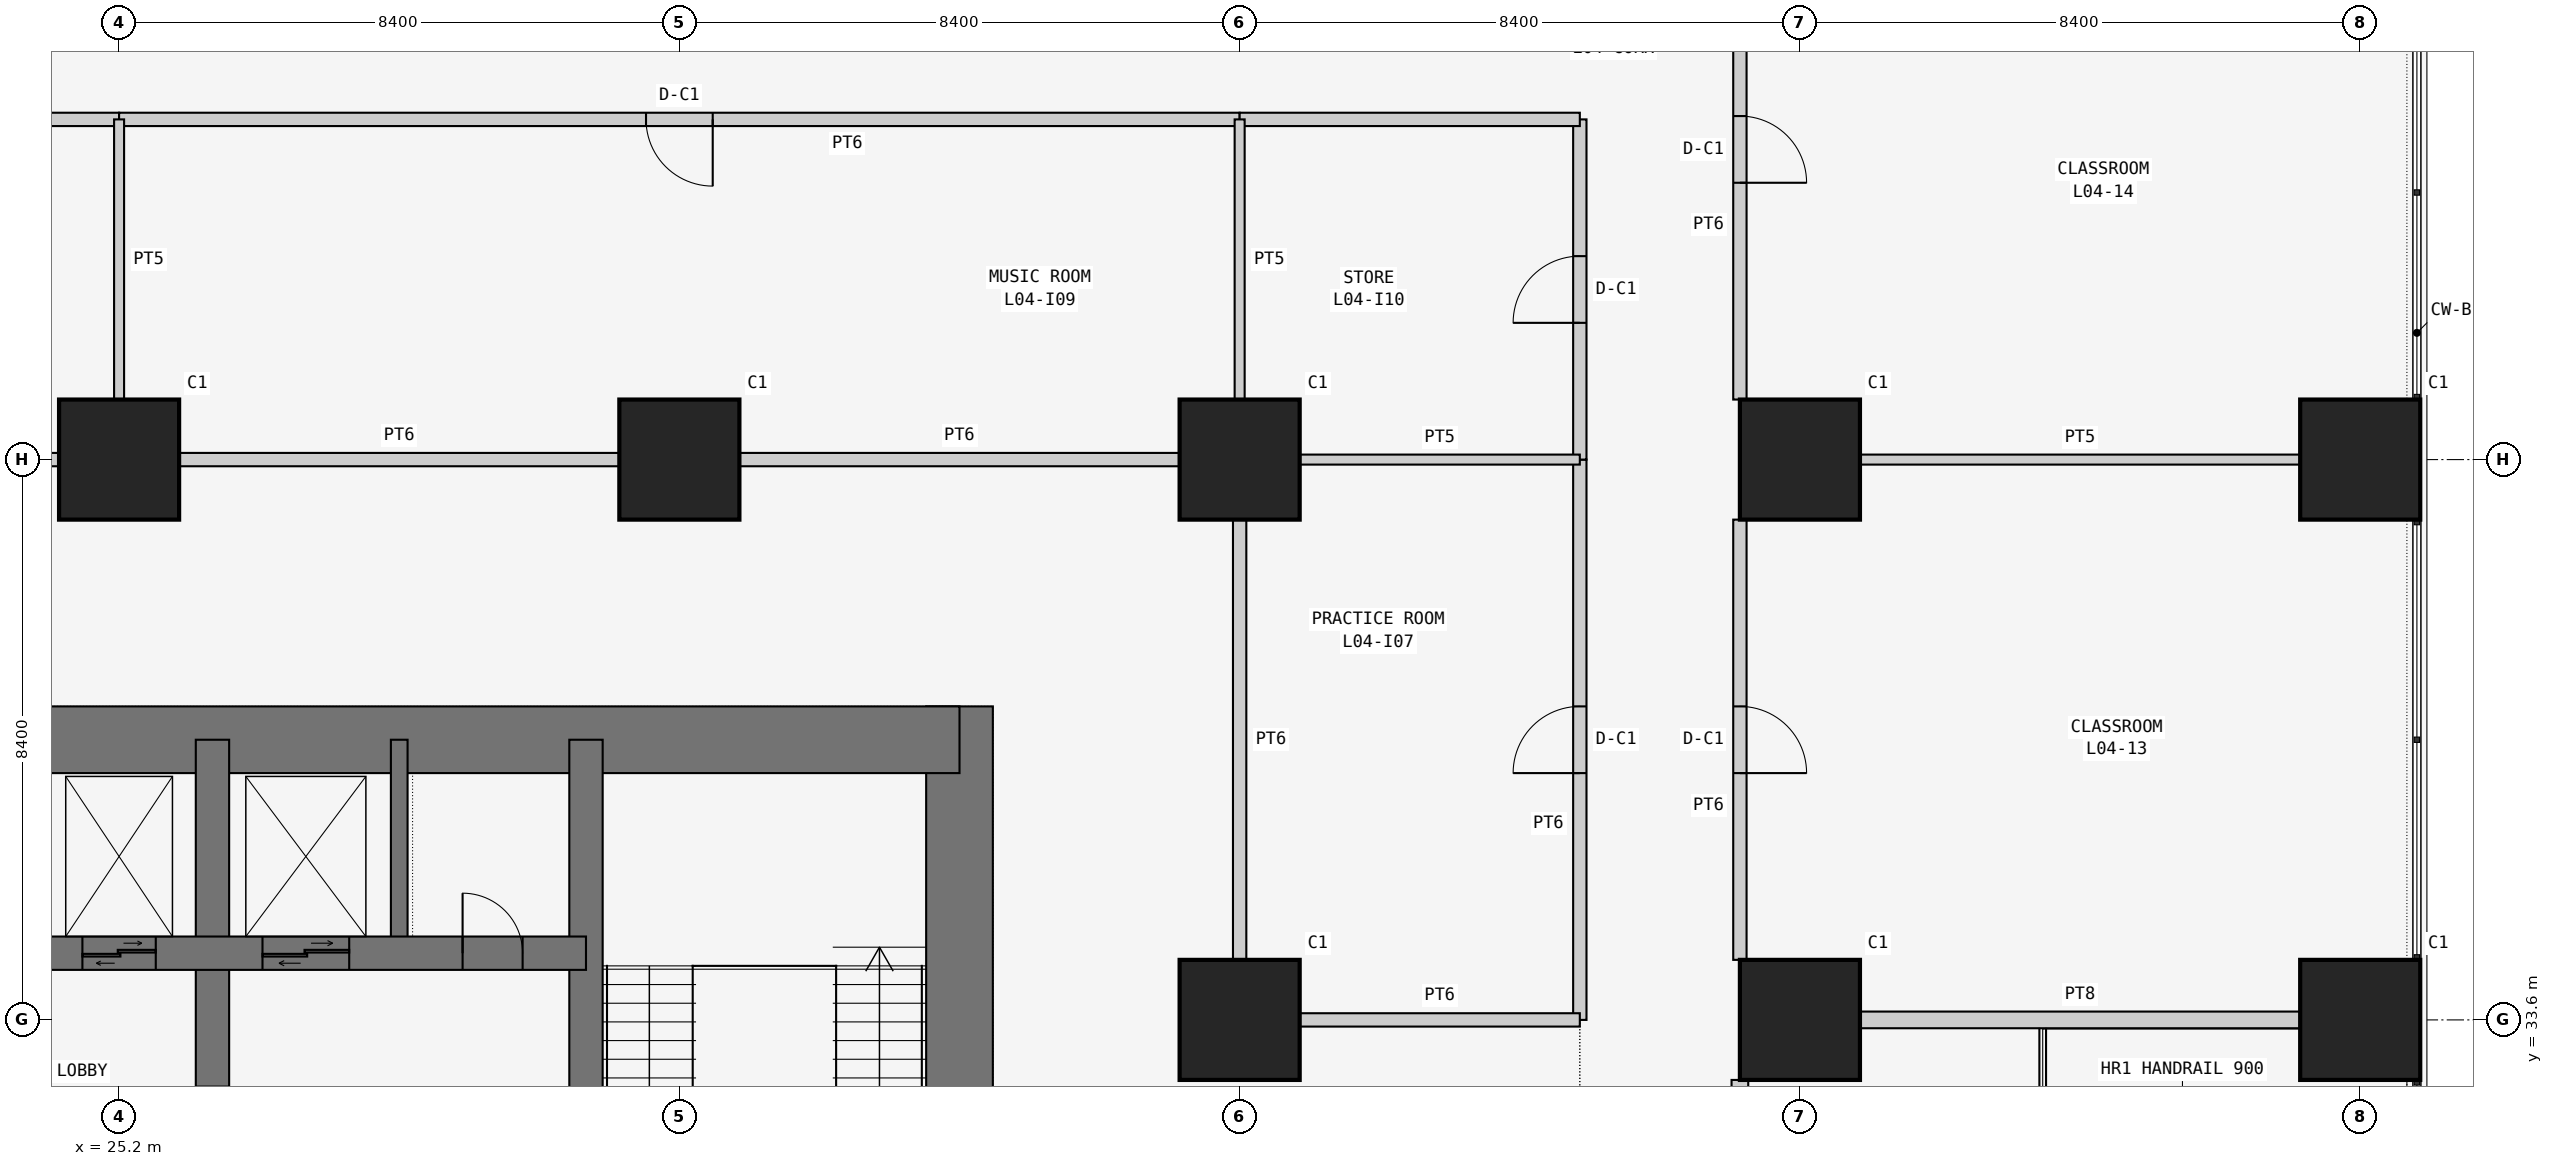
"""IFC4 building model, lengths in metres.
Left out: names, types, materials, properties, quantities, classifications, styles, units other than length and angle.
Written with IfcOpenShell. Run it as: python <this file> out.ifc"""

import sys

from ifc_helpers import new_model, si_unit, direction, frame, frame_2d, origin, origin_2d, place, context, subcontext, project, spatial, rectangle, extrude, element, fill, save


model = new_model("IFC4")
c1 = context("Model", 3, precision=1e-05, world=origin(), true_north=direction((0.0, 1.0)))
c2 = subcontext(c1, "Body", "Model", "MODEL_VIEW")
j1 = project(units=[si_unit("LENGTHUNIT", "METRE"), si_unit("PLANEANGLEUNIT", "RADIAN")], contexts=[c1])
p1 = place(None, origin())
s1 = spatial("IfcSite", under=j1, at=p1, CompositionType="ELEMENT")
p2 = place(p1, origin())
s2 = spatial("IfcBuilding", under=s1, at=p2, CompositionType="ELEMENT")
p3 = place(p2, frame((0.0, 0.0, 19.5)))
s3 = spatial("IfcBuildingStorey", under=s2, at=p3, CompositionType="ELEMENT", Elevation=19.5)
for number, where, z_axis, x_axis in (
    (1, (25.2, 42.0, 0.0), (0.0, 0.0, 1.0), (1.0, 0.0, 0.0)),
    (2, (33.6, 42.0, 0.0), (0.0, 0.0, 1.0), (1.0, 0.0, 0.0)),
    (3, (42.0, 33.6, 0.0), (0.0, 0.0, 1.0), (1.0, 0.0, 0.0)),
    (4, (42.0, 42.0, 0.0), (0.0, 0.0, 1.0), (1.0, 0.0, 0.0)),
    (5, (50.4, 33.6, 0.0), (0.0, 0.0, 1.0), (1.0, 0.0, 0.0)),
    (6, (50.4, 42.0, 0.0), (0.0, 0.0, 1.0), (1.0, 0.0, 0.0)),
    (7, (58.8, 33.6, 0.0), (0.0, 0.0, 1.0), (1.0, 0.0, 0.0)),
    (8, (58.8, 42.0, 0.0), (0.0, 0.0, 1.0), (1.0, 0.0, 0.0)),
):
    element("IfcColumn", number, at=place(p3, frame(where, z_axis=z_axis, x_axis=x_axis)), inside=s3, PredefinedType="COLUMN", context=c2, shape_type="SweptSolid", body=[
        extrude(rectangle(XDim=1.8, YDim=1.8, at=origin_2d()), origin(), (0.0, 0.0, 1.0), 4.5),
    ])
p4 = place(p3, frame((37.8, 21.0, 0.0), z_axis=(0.0, 0.0, 1.0), x_axis=(0.0, 1.0, 0.0)))
e9 = element("IfcWall", 9, at=p4, inside=s3, PredefinedType="SHEAR", context=c2, shape_type="SweptSolid", body=[
    extrude(rectangle(XDim=17.3, YDim=1.0, at=frame_2d((8.65, 0.0))), origin(), (0.0, 0.0, 1.0), 4.5),
])
p5 = place(p4, frame((5.2, 0.0, 0.0)))
e10 = element("IfcOpeningElement", 10, at=p5, cuts=e9, PredefinedType="OPENING", context=c2, shape_type="SweptSolid", body=[
    extrude(rectangle(XDim=1.2, YDim=2.1, at=frame_2d((0.6, 1.05))), frame((0.0, 0.51, 0.0), z_axis=(0.0, -1.0, 0.0), x_axis=(1.0, 0.0, 0.0)), (0.0, 0.0, 1.0), 1.02),
])
p6 = place(p3, frame((37.8, 37.8, 0.0), z_axis=(0.0, 0.0, 1.0), x_axis=(-1.0, 0.0, 0.0)))
e11 = element("IfcWall", 11, at=p6, inside=s3, PredefinedType="SHEAR", context=c2, shape_type="SweptSolid", body=[
    extrude(rectangle(XDim=17.3, YDim=1.0, at=frame_2d((8.65, 0.0))), origin(), (0.0, 0.0, 1.0), 4.5),
])
p7 = place(p3, frame((26.6, 21.0, 0.0), z_axis=(0.0, 0.0, 1.0), x_axis=(0.0, 1.0, 0.0)))
e12 = element("IfcWall", 12, at=p7, inside=s3, PredefinedType="SHEAR", context=c2, shape_type="SweptSolid", body=[
    extrude(rectangle(XDim=16.8, YDim=0.5, at=frame_2d((8.4, 0.0))), origin(), (0.0, 0.0, 1.0), 4.5),
])
p8 = place(p7, frame((10.4, 0.0, 0.0)))
e13 = element("IfcOpeningElement", 13, at=p8, cuts=e12, PredefinedType="OPENING", context=c2, shape_type="SweptSolid", body=[
    extrude(rectangle(XDim=1.2, YDim=2.1, at=frame_2d((0.6, 1.05))), frame((0.0, 0.26, 0.0), z_axis=(0.0, -1.0, 0.0), x_axis=(1.0, 0.0, 0.0)), (0.0, 0.0, 1.0), 0.52),
])
p9 = place(p3, frame((21.0, 34.6, 0.0), z_axis=(0.0, 0.0, 1.0), x_axis=(1.0, 0.0, 0.0)))
e14 = element("IfcWall", 14, at=p9, inside=s3, PredefinedType="SHEAR", context=c2, shape_type="SweptSolid", body=[
    extrude(rectangle(XDim=11.2, YDim=0.5, at=frame_2d((5.6, 0.0))), origin(), (0.0, 0.0, 1.0), 4.5),
])
p10 = place(p9, frame((9.35, 0.0, 0.0)))
e15 = element("IfcOpeningElement", 15, at=p10, cuts=e14, PredefinedType="OPENING", context=c2, shape_type="SweptSolid", body=[
    extrude(rectangle(XDim=0.9, YDim=2.1, at=frame_2d((0.45, 1.05))), frame((0.0, 0.26, 0.0), z_axis=(0.0, -1.0, 0.0), x_axis=(1.0, 0.0, 0.0)), (0.0, 0.0, 1.0), 0.52),
])
p11 = place(p9, frame((1.0, 0.0, 0.0)))
e16 = element("IfcOpeningElement", 16, at=p11, cuts=e14, PredefinedType="OPENING", context=c2, shape_type="SweptSolid", body=[
    extrude(rectangle(XDim=1.1, YDim=2.1, at=frame_2d((0.55, 1.05))), frame((0.0, 0.26, 0.0), z_axis=(0.0, -1.0, 0.0), x_axis=(1.0, 0.0, 0.0)), (0.0, 0.0, 1.0), 0.52),
])
p12 = place(p9, frame((3.65, 0.0, 0.0)))
e17 = element("IfcOpeningElement", 17, at=p12, cuts=e14, PredefinedType="OPENING", context=c2, shape_type="SweptSolid", body=[
    extrude(rectangle(XDim=1.1, YDim=2.1, at=frame_2d((0.55, 1.05))), frame((0.0, 0.26, 0.0), z_axis=(0.0, -1.0, 0.0), x_axis=(1.0, 0.0, 0.0)), (0.0, 0.0, 1.0), 0.52),
])
p13 = place(p9, frame((6.35, 0.0, 0.0)))
e18 = element("IfcOpeningElement", 18, at=p13, cuts=e14, PredefinedType="OPENING", context=c2, shape_type="SweptSolid", body=[
    extrude(rectangle(XDim=1.3, YDim=2.1, at=frame_2d((0.65, 1.05))), frame((0.0, 0.26, 0.0), z_axis=(0.0, -1.0, 0.0), x_axis=(1.0, 0.0, 0.0)), (0.0, 0.0, 1.0), 0.52),
])
p14 = place(p3, frame((32.2, 29.15, 0.0), z_axis=(0.0, 0.0, 1.0), x_axis=(0.0, 1.0, 0.0)))
e19 = element("IfcWall", 19, at=p14, inside=s3, PredefinedType="SHEAR", context=c2, shape_type="SweptSolid", body=[
    extrude(rectangle(XDim=8.65, YDim=0.5, at=frame_2d((4.325, 0.0))), origin(), (0.0, 0.0, 1.0), 4.5),
])
p15 = place(p3, frame((29.4, 34.6, 0.0), z_axis=(0.0, 0.0, 1.0), x_axis=(0.0, 1.0, 0.0)))
e20 = element("IfcWall", 20, at=p15, inside=s3, PredefinedType="SHEAR", context=c2, shape_type="SweptSolid", body=[
    extrude(rectangle(XDim=3.2, YDim=0.25, at=frame_2d((1.6, 0.0))), origin(), (0.0, 0.0, 1.0), 4.5),
])
p16 = place(p3, frame((51.3, 33.6, 0.0), z_axis=(0.0, 0.0, 1.0), x_axis=(1.0, 0.0, 0.0)))
e21 = element("IfcWall", 21, at=p16, inside=s3, PredefinedType="SOLIDWALL", context=c2, shape_type="SweptSolid", body=[
    extrude(rectangle(XDim=6.6, YDim=0.25, at=frame_2d((3.3, 0.0))), origin(), (0.0, 0.0, 1.0), 3.543),
])
p17 = place(p3, frame((49.5, 26.1, 0.0), z_axis=(0.0, 0.0, 1.0), x_axis=(0.0, 1.0, 0.0)))
e22 = element("IfcWall", 22, at=p17, inside=s3, PredefinedType="SOLIDWALL", context=c2, shape_type="SweptSolid", body=[
    extrude(rectangle(XDim=6.6, YDim=0.25, at=frame_2d((3.3, 0.0))), origin(), (0.0, 0.0, 1.0), 4.3),
])
p18 = place(p17, frame((2.0, 0.0, 0.0)))
e23 = element("IfcOpeningElement", 23, at=p18, cuts=e22, PredefinedType="OPENING", context=c2, shape_type="SweptSolid", body=[
    extrude(rectangle(XDim=2.6, YDim=2.4, at=frame_2d((1.3, 1.2))), frame((0.0, 0.135, 0.0), z_axis=(0.0, -1.0, 0.0), x_axis=(1.0, 0.0, 0.0)), (0.0, 0.0, 1.0), 0.27),
])
p19 = place(p3, frame((51.3, 42.0, 0.0), z_axis=(0.0, 0.0, 1.0), x_axis=(1.0, 0.0, 0.0)))
e24 = element("IfcWall", 24, at=p19, inside=s3, PredefinedType="PARTITIONING", context=c2, shape_type="SweptSolid", body=[
    extrude(rectangle(XDim=6.6, YDim=0.15, at=frame_2d((3.3, 0.0))), origin(), (0.0, 0.0, 1.0), 3.543),
])
p20 = place(p3, frame((49.5, 34.5, 0.0), z_axis=(0.0, 0.0, 1.0), x_axis=(0.0, 1.0, 0.0)))
e25 = element("IfcWall", 25, at=p20, inside=s3, PredefinedType="PARTITIONING", context=c2, shape_type="SweptSolid", body=[
    extrude(rectangle(XDim=6.6, YDim=0.2, at=frame_2d((3.3, 0.0))), origin(), (0.0, 0.0, 1.0), 4.3),
])
p21 = place(p20, frame((2.8, 0.0, 0.0)))
e26 = element("IfcOpeningElement", 26, at=p21, cuts=e25, PredefinedType="OPENING", context=c2, shape_type="SweptSolid", body=[
    extrude(rectangle(XDim=1.0, YDim=2.1, at=frame_2d((0.5, 1.05))), frame((0.0, 0.11, 0.0), z_axis=(0.0, -1.0, 0.0), x_axis=(1.0, 0.0, 0.0)), (0.0, 0.0, 1.0), 0.22),
])
p22 = place(p3, frame((49.5, 42.9, 0.0), z_axis=(0.0, 0.0, 1.0), x_axis=(0.0, 1.0, 0.0)))
e27 = element("IfcWall", 27, at=p22, inside=s3, PredefinedType="PARTITIONING", context=c2, shape_type="SweptSolid", body=[
    extrude(rectangle(XDim=7.5, YDim=0.2, at=frame_2d((3.75, 0.0))), origin(), (0.0, 0.0, 1.0), 4.3),
])
p23 = place(p22, frame((3.25, 0.0, 0.0)))
e28 = element("IfcOpeningElement", 28, at=p23, cuts=e27, PredefinedType="OPENING", context=c2, shape_type="SweptSolid", body=[
    extrude(rectangle(XDim=1.0, YDim=2.1, at=frame_2d((0.5, 1.05))), frame((0.0, 0.11, 0.0), z_axis=(0.0, -1.0, 0.0), x_axis=(1.0, 0.0, 0.0)), (0.0, 0.0, 1.0), 0.22),
])
p24 = place(p3, frame((47.1, 33.6, 0.0), z_axis=(0.0, 0.0, 1.0), x_axis=(0.0, 1.0, 0.0)))
e29 = element("IfcWall", 29, at=p24, inside=s3, PredefinedType="PARTITIONING", context=c2, shape_type="SweptSolid", body=[
    extrude(rectangle(XDim=8.4, YDim=0.2, at=frame_2d((4.2, 0.0))), origin(), (0.0, 0.0, 1.0), 4.3),
])
p25 = place(p24, frame((3.7, 0.0, 0.0)))
e30 = element("IfcOpeningElement", 30, at=p25, cuts=e29, PredefinedType="OPENING", context=c2, shape_type="SweptSolid", body=[
    extrude(rectangle(XDim=1.0, YDim=2.1, at=frame_2d((0.5, 1.05))), frame((0.0, 0.11, 0.0), z_axis=(0.0, -1.0, 0.0), x_axis=(1.0, 0.0, 0.0)), (0.0, 0.0, 1.0), 0.22),
])
p26 = place(p3, frame((25.2, 47.1, 0.0), z_axis=(0.0, 0.0, 1.0), x_axis=(-1.0, 0.0, 0.0)))
e31 = element("IfcWall", 31, at=p26, inside=s3, PredefinedType="PARTITIONING", context=c2, shape_type="SweptSolid", body=[
    extrude(rectangle(XDim=9.75, YDim=0.2, at=frame_2d((4.875, 0.0))), origin(), (0.0, 0.0, 1.0), 4.3),
])
p27 = place(p26, frame((4.375, 0.0, 0.0)))
e32 = element("IfcOpeningElement", 32, at=p27, cuts=e31, PredefinedType="OPENING", context=c2, shape_type="SweptSolid", body=[
    extrude(rectangle(XDim=1.0, YDim=2.1, at=frame_2d((0.5, 1.05))), frame((0.0, 0.11, 0.0), z_axis=(0.0, -1.0, 0.0), x_axis=(1.0, 0.0, 0.0)), (0.0, 0.0, 1.0), 0.22),
])
p28 = place(p3, frame((42.0, 47.1, 0.0), z_axis=(0.0, 0.0, 1.0), x_axis=(-1.0, 0.0, 0.0)))
e33 = element("IfcWall", 33, at=p28, inside=s3, PredefinedType="PARTITIONING", context=c2, shape_type="SweptSolid", body=[
    extrude(rectangle(XDim=16.8, YDim=0.2, at=frame_2d((8.4, 0.0))), origin(), (0.0, 0.0, 1.0), 4.3),
])
p29 = place(p28, frame((7.9, 0.0, 0.0)))
e34 = element("IfcOpeningElement", 34, at=p29, cuts=e33, PredefinedType="OPENING", context=c2, shape_type="SweptSolid", body=[
    extrude(rectangle(XDim=1.0, YDim=2.1, at=frame_2d((0.5, 1.05))), frame((0.0, 0.11, 0.0), z_axis=(0.0, -1.0, 0.0), x_axis=(1.0, 0.0, 0.0)), (0.0, 0.0, 1.0), 0.22),
])
p30 = place(p3, frame((47.1, 42.0, 0.0), z_axis=(0.0, 0.0, 1.0), x_axis=(0.0, 1.0, 0.0)))
e35 = element("IfcWall", 35, at=p30, inside=s3, PredefinedType="PARTITIONING", context=c2, shape_type="SweptSolid", body=[
    extrude(rectangle(XDim=5.1, YDim=0.2, at=frame_2d((2.55, 0.0))), origin(), (0.0, 0.0, 1.0), 4.3),
])
p31 = place(p30, frame((2.05, 0.0, 0.0)))
e36 = element("IfcOpeningElement", 36, at=p31, cuts=e35, PredefinedType="OPENING", context=c2, shape_type="SweptSolid", body=[
    extrude(rectangle(XDim=1.0, YDim=2.1, at=frame_2d((0.5, 1.05))), frame((0.0, 0.11, 0.0), z_axis=(0.0, -1.0, 0.0), x_axis=(1.0, 0.0, 0.0)), (0.0, 0.0, 1.0), 0.22),
])
p32 = place(p3, frame((47.1, 47.1, 0.0), z_axis=(0.0, 0.0, 1.0), x_axis=(-1.0, 0.0, 0.0)))
e37 = element("IfcWall", 37, at=p32, inside=s3, PredefinedType="PARTITIONING", context=c2, shape_type="SweptSolid", body=[
    extrude(rectangle(XDim=5.1, YDim=0.2, at=frame_2d((2.55, 0.0))), origin(), (0.0, 0.0, 1.0), 4.3),
])
p33 = place(p3, frame((42.0, 41.1, 0.0), z_axis=(0.0, 0.0, 1.0), x_axis=(0.0, -1.0, 0.0)))
e38 = element("IfcWall", 38, at=p33, inside=s3, PredefinedType="PARTITIONING", context=c2, shape_type="SweptSolid", body=[
    extrude(rectangle(XDim=6.6, YDim=0.2, at=frame_2d((3.3, 0.0))), origin(), (0.0, 0.0, 1.0), 3.543),
])
p34 = place(p3, frame((42.9, 33.6, 0.0), z_axis=(0.0, 0.0, 1.0), x_axis=(1.0, 0.0, 0.0)))
e39 = element("IfcWall", 39, at=p34, inside=s3, PredefinedType="PARTITIONING", context=c2, shape_type="SweptSolid", body=[
    extrude(rectangle(XDim=4.2, YDim=0.2, at=frame_2d((2.1, 0.0))), origin(), (0.0, 0.0, 1.0), 3.543),
])
p35 = place(p3, frame((20.5, 42.0, 0.0), z_axis=(0.0, 0.0, 1.0), x_axis=(1.0, 0.0, 0.0)))
e40 = element("IfcWall", 40, at=p35, inside=s3, PredefinedType="PARTITIONING", context=c2, shape_type="SweptSolid", body=[
    extrude(rectangle(XDim=3.8, YDim=0.2, at=frame_2d((1.9, 0.0))), origin(), (0.0, 0.0, 1.0), 3.543),
])
p36 = place(p3, frame((26.1, 42.0, 0.0), z_axis=(0.0, 0.0, 1.0), x_axis=(1.0, 0.0, 0.0)))
e41 = element("IfcWall", 41, at=p36, inside=s3, PredefinedType="PARTITIONING", context=c2, shape_type="SweptSolid", body=[
    extrude(rectangle(XDim=6.6, YDim=0.2, at=frame_2d((3.3, 0.0))), origin(), (0.0, 0.0, 1.0), 3.543),
])
p37 = place(p3, frame((34.5, 42.0, 0.0), z_axis=(0.0, 0.0, 1.0), x_axis=(1.0, 0.0, 0.0)))
e42 = element("IfcWall", 42, at=p37, inside=s3, PredefinedType="PARTITIONING", context=c2, shape_type="SweptSolid", body=[
    extrude(rectangle(XDim=6.6, YDim=0.2, at=frame_2d((3.3, 0.0))), origin(), (0.0, 0.0, 1.0), 3.543),
])
for number, where, z_axis, x_axis in (
    (43, (42.9, 42.0, 0.0), (0.0, 0.0, 1.0), (1.0, 0.0, 0.0)),
    (44, (25.2, 47.1, 0.0), (0.0, 0.0, 1.0), (0.0, -1.0, 0.0)),
    (45, (42.0, 47.1, 0.0), (0.0, 0.0, 1.0), (0.0, -1.0, 0.0)),
):
    element("IfcWall", number, at=place(p3, frame(where, z_axis=z_axis, x_axis=x_axis)), inside=s3, PredefinedType="PARTITIONING", context=c2, shape_type="SweptSolid", body=[
        extrude(rectangle(XDim=4.2, YDim=0.15, at=frame_2d((2.1, 0.0))), origin(), (0.0, 0.0, 1.0), 3.543),
    ])
p38 = place(p21, frame((1.0, 0.0, 0.0), z_axis=(0.0, 0.0, 1.0), x_axis=(-1.0, 0.0, 0.0)))
e46 = element("IfcDoor", 46, at=p38, inside=s3, OperationType="SINGLE_SWING_RIGHT", PredefinedType="DOOR", context=c2, shape_type="SweptSolid", body=[
    extrude(rectangle(XDim=1.0, YDim=2.1, at=frame_2d((0.5, 1.05))), frame((0.0, 0.025, 0.0), z_axis=(0.0, -1.0, 0.0), x_axis=(1.0, 0.0, 0.0)), (0.0, 0.0, 1.0), 0.05),
])
fill(e26, e46)
p39 = place(p23, frame((1.0, 0.0, 0.0), z_axis=(0.0, 0.0, 1.0), x_axis=(-1.0, 0.0, 0.0)))
e47 = element("IfcDoor", 47, at=p39, inside=s3, OperationType="SINGLE_SWING_RIGHT", PredefinedType="DOOR", context=c2, shape_type="SweptSolid", body=[
    extrude(rectangle(XDim=1.0, YDim=2.1, at=frame_2d((0.5, 1.05))), frame((0.0, 0.025, 0.0), z_axis=(0.0, -1.0, 0.0), x_axis=(1.0, 0.0, 0.0)), (0.0, 0.0, 1.0), 0.05),
])
fill(e28, e47)
p40 = place(p25, origin())
e48 = element("IfcDoor", 48, at=p40, inside=s3, OperationType="SINGLE_SWING_LEFT", PredefinedType="DOOR", context=c2, shape_type="SweptSolid", body=[
    extrude(rectangle(XDim=1.0, YDim=2.1, at=frame_2d((0.5, 1.05))), frame((0.0, 0.025, 0.0), z_axis=(0.0, -1.0, 0.0), x_axis=(1.0, 0.0, 0.0)), (0.0, 0.0, 1.0), 0.05),
])
fill(e30, e48)
p41 = place(p29, origin())
e49 = element("IfcDoor", 49, at=p41, inside=s3, OperationType="SINGLE_SWING_LEFT", PredefinedType="DOOR", context=c2, shape_type="SweptSolid", body=[
    extrude(rectangle(XDim=1.0, YDim=2.1, at=frame_2d((0.5, 1.05))), frame((0.0, 0.025, 0.0), z_axis=(0.0, -1.0, 0.0), x_axis=(1.0, 0.0, 0.0)), (0.0, 0.0, 1.0), 0.05),
])
fill(e34, e49)
p42 = place(p31, origin())
e50 = element("IfcDoor", 50, at=p42, inside=s3, OperationType="SINGLE_SWING_LEFT", PredefinedType="DOOR", context=c2, shape_type="SweptSolid", body=[
    extrude(rectangle(XDim=1.0, YDim=2.1, at=frame_2d((0.5, 1.05))), frame((0.0, 0.025, 0.0), z_axis=(0.0, -1.0, 0.0), x_axis=(1.0, 0.0, 0.0)), (0.0, 0.0, 1.0), 0.05),
])
fill(e36, e50)
p43 = place(p10, origin())
e51 = element("IfcDoor", 51, at=p43, inside=s3, OperationType="SINGLE_SWING_LEFT", PredefinedType="DOOR", context=c2, shape_type="SweptSolid", body=[
    extrude(rectangle(XDim=0.9, YDim=2.1, at=frame_2d((0.45, 1.05))), frame((0.0, 0.025, 0.0), z_axis=(0.0, -1.0, 0.0), x_axis=(1.0, 0.0, 0.0)), (0.0, 0.0, 1.0), 0.05),
])
fill(e15, e51)
p44 = place(p12, origin())
e52 = element("IfcDoor", 52, at=p44, inside=s3, OperationType="DOUBLE_DOOR_SLIDING", PredefinedType="DOOR", context=c2, shape_type="SweptSolid", body=[
    extrude(rectangle(XDim=1.1, YDim=2.1, at=frame_2d((0.55, 1.05))), frame((0.0, 0.025, 0.0), z_axis=(0.0, -1.0, 0.0), x_axis=(1.0, 0.0, 0.0)), (0.0, 0.0, 1.0), 0.05),
])
fill(e17, e52)
p45 = place(p13, origin())
e53 = element("IfcDoor", 53, at=p45, inside=s3, OperationType="DOUBLE_DOOR_SLIDING", PredefinedType="DOOR", context=c2, shape_type="SweptSolid", body=[
    extrude(rectangle(XDim=1.3, YDim=2.1, at=frame_2d((0.65, 1.05))), frame((0.0, 0.025, 0.0), z_axis=(0.0, -1.0, 0.0), x_axis=(1.0, 0.0, 0.0)), (0.0, 0.0, 1.0), 0.05),
])
fill(e18, e53)
save(model, sys.argv[1])
